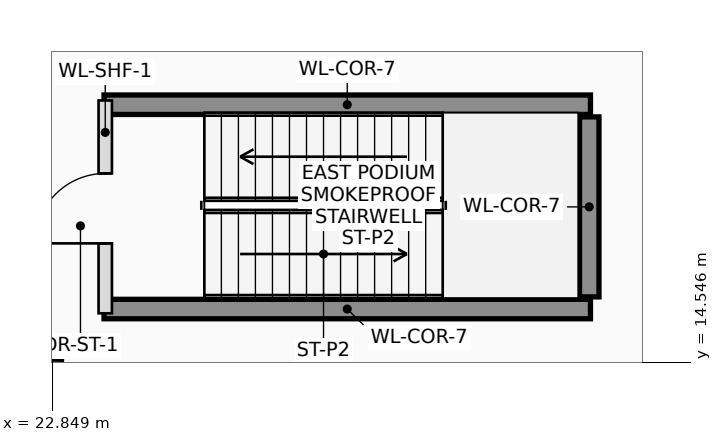
"""IFC4 building model, lengths in metres.
Left out: names, types, materials, properties, quantities, classifications, styles, units other than length and angle.
Written with IfcOpenShell. Run it as: python <this file> out.ifc"""

import sys

from ifc_helpers import new_model, si_unit, direction, frame, frame_2d, origin, origin_2d, place, context, subcontext, project, spatial, rectangle, extrude, source, transform, mapped, element, fill, save


model = new_model("IFC4")
c1 = context("Model", 3, precision=1e-05, world=origin(), true_north=direction((0.0, 1.0)))
c2 = subcontext(c1, "Body", "Model", "MODEL_VIEW")
j1 = project(units=[si_unit("LENGTHUNIT", "METRE"), si_unit("PLANEANGLEUNIT", "RADIAN")], contexts=[c1])
p1 = place(None, origin())
s1 = spatial("IfcSite", under=j1, at=p1, CompositionType="ELEMENT")
p2 = place(p1, origin())
s2 = spatial("IfcBuilding", under=s1, at=p2, CompositionType="ELEMENT")
p3 = place(p2, frame((0.0, 0.0, -4.8)))
s3 = spatial("IfcBuildingStorey", under=s2, at=p3, CompositionType="ELEMENT", Elevation=-4.8)
for number, where, z_axis, x_axis in (
    (1, (23.7, 18.78, 0.0), (0.0, 0.0, 1.0), (1.0, 0.0, 0.0)),
    (2, (23.7, 15.42, 0.0), (0.0, 0.0, 1.0), (1.0, 0.0, 0.0)),
):
    element("IfcWall", number, at=place(p3, frame(where, z_axis=z_axis, x_axis=x_axis)), inside=s3, PredefinedType="SHEAR", context=c2, shape_type="SweptSolid", body=[
        extrude(rectangle(XDim=8.0, YDim=0.32, at=frame_2d((4.0, 0.0))), origin(), (0.0, 0.0, 1.0), 4.8),
    ])
p4 = place(p3, frame((31.68, 15.62, 0.0), z_axis=(0.0, 0.0, 1.0), x_axis=(0.0, 1.0, 0.0)))
e3 = element("IfcWall", 3, at=p4, inside=s3, PredefinedType="SHEAR", context=c2, shape_type="SweptSolid", body=[
    extrude(rectangle(XDim=2.96, YDim=0.32, at=frame_2d((1.48, 0.0))), origin(), (0.0, 0.0, 1.0), 4.8),
])
m1 = source(origin(), c2, "Body", "SweptSolid", [
    extrude(rectangle(XDim=1.2, YDim=1.2, at=origin_2d()), origin(), (0.0, 0.0, 1.0), 4.8),
])
p5 = place(p3, frame((22.4, 14.0, 0.0), z_axis=(0.0, 0.0, 1.0), x_axis=(1.0, 0.0, 0.0)))
e4 = element("IfcColumn", 4, at=p5, inside=s3, PredefinedType="COLUMN", context=c2, shape_type="MappedRepresentation", body=[
    mapped(m1, transform((0.0, 0.0, 0.0), scale=1.0)),
])
p6 = place(p3, frame((23.72, 15.35, 0.0), z_axis=(0.0, 0.0, 1.0), x_axis=(0.0, 1.0, 0.0)))
e5 = element("IfcWall", 5, at=p6, inside=s3, PredefinedType="PLUMBINGWALL", context=c2, shape_type="SweptSolid", body=[
    extrude(rectangle(XDim=3.5, YDim=0.22, at=frame_2d((1.75, 0.0))), origin(), (0.0, 0.0, 1.0), 4.54),
])
p7 = place(p6, frame((1.15, 0.0, 0.0)))
e6 = element("IfcOpeningElement", 6, at=p7, cuts=e5, PredefinedType="OPENING", context=c2, shape_type="SweptSolid", body=[
    extrude(rectangle(XDim=1.15, YDim=2.15, at=frame_2d((0.575, 1.075))), frame((0.0, 0.12, 0.0), z_axis=(0.0, -1.0, 0.0), x_axis=(1.0, 0.0, 0.0)), (0.0, 0.0, 1.0), 0.24),
])
p8 = place(p7, origin())
e7 = element("IfcDoor", 7, at=p8, inside=s3, OperationType="SINGLE_SWING_LEFT", PredefinedType="DOOR", context=c2, shape_type="SweptSolid", body=[
    extrude(rectangle(XDim=1.15, YDim=2.15, at=frame_2d((0.575, 1.075))), frame((0.0, 0.025, 0.0), z_axis=(0.0, -1.0, 0.0), x_axis=(1.0, 0.0, 0.0)), (0.0, 0.0, 1.0), 0.05),
])
fill(e6, e7)
save(model, sys.argv[1])
